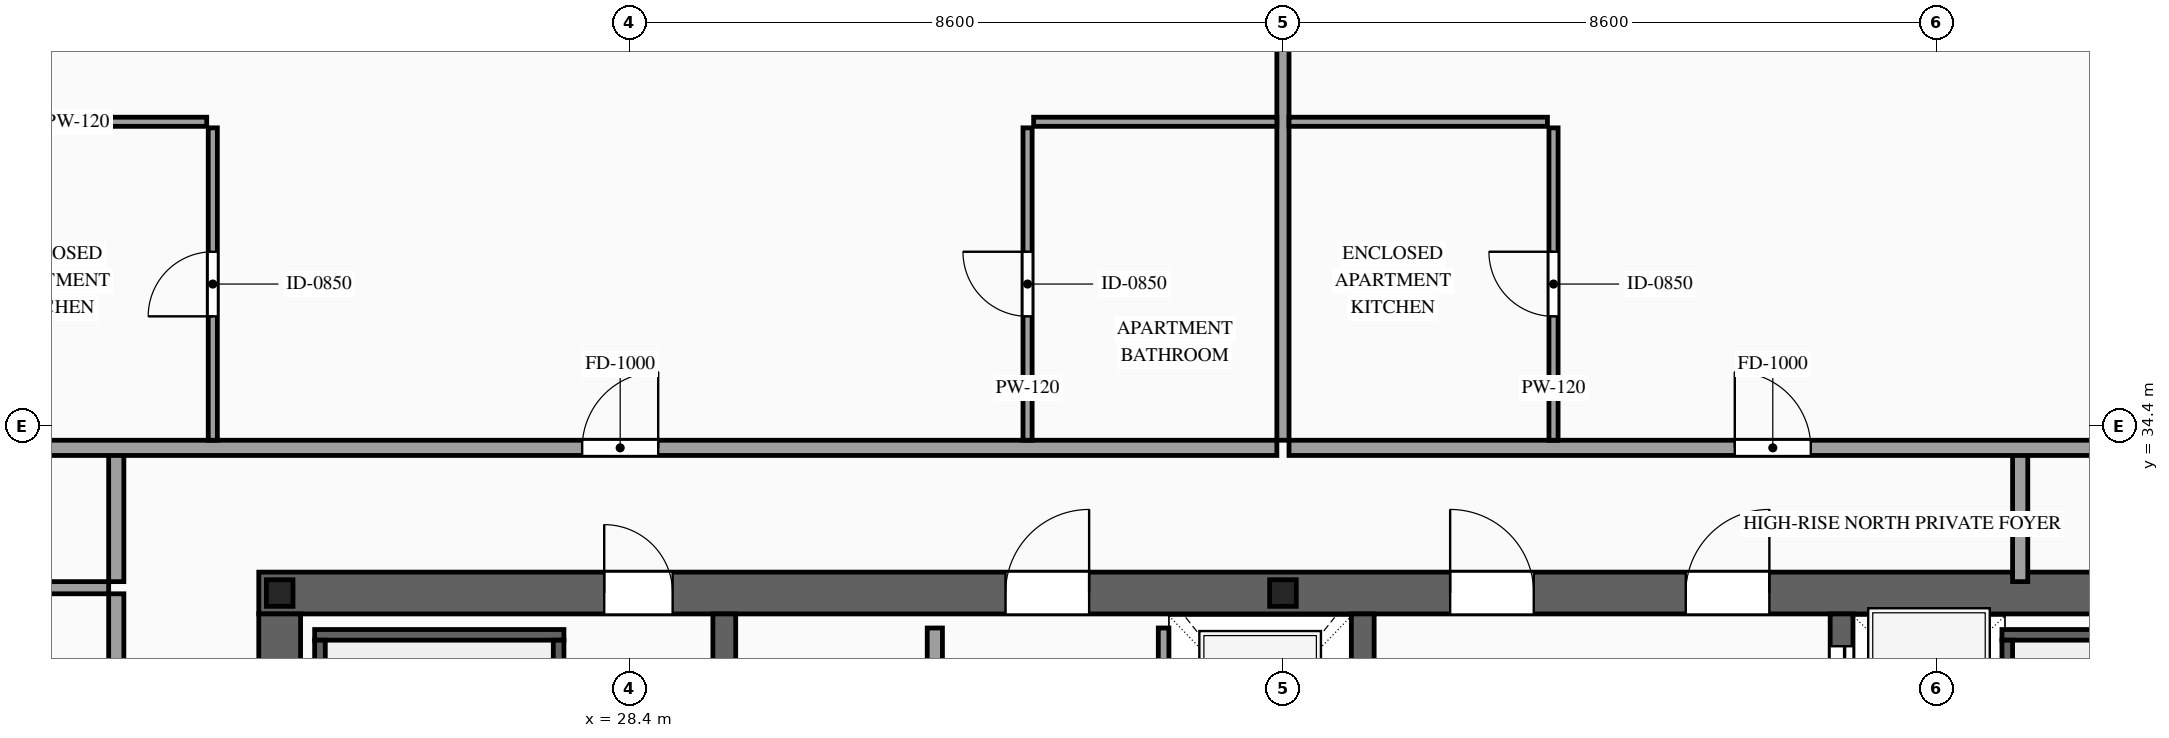
"""IFC4 building model, lengths in metres.
Left out: names, types, materials, properties, quantities, classifications, styles, units other than length and angle.
Written with IfcOpenShell. Run it as: python <this file> out.ifc"""

import sys

from ifc_helpers import new_model, si_unit, direction, frame, frame_2d, origin, origin_2d, place, context, subcontext, project, spatial, rectangle, i_section, extrude, source, transform, mapped, element, fill, save


model = new_model("IFC4")
c1 = context("Model", 3, precision=1e-05, world=origin(), true_north=direction((0.0, 1.0)))
c2 = subcontext(c1, "Body", "Model", "MODEL_VIEW")
j1 = project(units=[si_unit("LENGTHUNIT", "METRE"), si_unit("PLANEANGLEUNIT", "RADIAN")], contexts=[c1])
p1 = place(None, origin())
s1 = spatial("IfcSite", under=j1, at=p1, CompositionType="ELEMENT")
p2 = place(p1, origin())
s2 = spatial("IfcBuilding", under=s1, at=p2, CompositionType="ELEMENT")
p3 = place(p2, frame((0.0, 0.0, 271.6)))
s3 = spatial("IfcBuildingStorey", under=s2, at=p3, CompositionType="ELEMENT", Elevation=271.6)
p4 = place(p3, frame((23.525, 32.2, 0.0), z_axis=(0.0, 0.0, 1.0), x_axis=(1.0, 0.0, 0.0)))
e1 = element("IfcWall", 1, at=p4, inside=s3, PredefinedType="SHEAR", context=c2, shape_type="SweptSolid", body=[
    extrude(rectangle(XDim=26.95, YDim=0.55, at=frame_2d((13.475, 0.0))), origin(), (0.0, 0.0, 1.0), 3.5),
])
p5 = place(p4, frame((4.545, 0.0, 0.0)))
e2 = element("IfcOpeningElement", 2, at=p5, cuts=e1, PredefinedType="OPENING", context=c2, shape_type="SweptSolid", body=[
    extrude(rectangle(XDim=0.9, YDim=2.15, at=frame_2d((0.45, 1.075))), frame((0.0, 0.29, 0.0), z_axis=(0.0, -1.0, 0.0), x_axis=(1.0, 0.0, 0.0)), (0.0, 0.0, 1.0), 0.58),
])
p6 = place(p4, frame((9.825, 0.0, 0.0)))
e3 = element("IfcOpeningElement", 3, at=p6, cuts=e1, PredefinedType="OPENING", context=c2, shape_type="SweptSolid", body=[
    extrude(rectangle(XDim=1.1, YDim=2.2, at=frame_2d((0.55, 1.1))), frame((0.0, 0.29, 0.0), z_axis=(0.0, -1.0, 0.0), x_axis=(1.0, 0.0, 0.0)), (0.0, 0.0, 1.0), 0.58),
])
p7 = place(p4, frame((15.675, 0.0, 0.0)))
e4 = element("IfcOpeningElement", 4, at=p7, cuts=e1, PredefinedType="OPENING", context=c2, shape_type="SweptSolid", body=[
    extrude(rectangle(XDim=1.1, YDim=2.2, at=frame_2d((0.55, 1.1))), frame((0.0, 0.29, 0.0), z_axis=(0.0, -1.0, 0.0), x_axis=(1.0, 0.0, 0.0)), (0.0, 0.0, 1.0), 0.58),
])
p8 = place(p4, frame((18.775, 0.0, 0.0)))
e5 = element("IfcOpeningElement", 5, at=p8, cuts=e1, PredefinedType="OPENING", context=c2, shape_type="SweptSolid", body=[
    extrude(rectangle(XDim=1.1, YDim=2.2, at=frame_2d((0.55, 1.1))), frame((0.0, 0.29, 0.0), z_axis=(0.0, -1.0, 0.0), x_axis=(1.0, 0.0, 0.0)), (0.0, 0.0, 1.0), 0.58),
])
m1 = source(origin(), c2, "Body", "SweptSolid", [
    extrude(rectangle(XDim=12.25, YDim=0.55, at=frame_2d((6.125, 0.0))), origin(), (0.0, 0.0, 1.0), 3.5),
])
p9 = place(p3, frame((23.8, 19.675, 0.0), z_axis=(0.0, 0.0, 1.0), x_axis=(0.0, 1.0, 0.0)))
e6 = element("IfcWall", 6, at=p9, inside=s3, PredefinedType="SHEAR", context=c2, shape_type="MappedRepresentation", body=[
    mapped(m1, transform((0.0, 0.0, 0.0), scale=1.0)),
])
m2 = source(origin(), c2, "Body", "SweptSolid", [
    extrude(rectangle(XDim=12.25, YDim=0.3, at=frame_2d((6.125, 0.0))), origin(), (0.0, 0.0, 1.0), 3.5),
])
for number, where, z_axis, x_axis in (
    (7, (29.65, 19.675, 0.0), (0.0, 0.0, 1.0), (0.0, 1.0, 0.0)),
    (8, (38.05, 19.675, 0.0), (0.0, 0.0, 1.0), (0.0, 1.0, 0.0)),
):
    element("IfcWall", number, at=place(p3, frame(where, z_axis=z_axis, x_axis=x_axis)), inside=s3, PredefinedType="SOLIDWALL", context=c2, shape_type="MappedRepresentation", body=[
        mapped(m2, transform((0.0, 0.0, 0.0), scale=1.0)),
    ])
p10 = place(p3, frame((44.35, 19.675, 0.0), z_axis=(0.0, 0.0, 1.0), x_axis=(0.0, 1.0, 0.0)))
e9 = element("IfcWall", 9, at=p10, inside=s3, PredefinedType="SOLIDWALL", context=c2, shape_type="SweptSolid", body=[
    extrude(rectangle(XDim=12.25, YDim=0.3, at=frame_2d((6.125, 0.0))), origin(), (0.0, 0.0, 1.0), 3.5),
])
p11 = place(p10, frame((6.525, 0.0, 0.0)))
e10 = element("IfcOpeningElement", 10, at=p11, cuts=e9, PredefinedType="OPENING", context=c2, shape_type="SweptSolid", body=[
    extrude(rectangle(XDim=1.1, YDim=2.2, at=frame_2d((0.55, 1.1))), frame((0.0, 0.165, 0.0), z_axis=(0.0, -1.0, 0.0), x_axis=(1.0, 0.0, 0.0)), (0.0, 0.0, 1.0), 0.33),
])
p12 = place(p10, frame((8.625, 0.0, 0.0)))
e11 = element("IfcOpeningElement", 11, at=p12, cuts=e9, PredefinedType="OPENING", context=c2, shape_type="SweptSolid", body=[
    extrude(rectangle(XDim=1.1, YDim=2.2, at=frame_2d((0.55, 1.1))), frame((0.0, 0.165, 0.0), z_axis=(0.0, -1.0, 0.0), x_axis=(1.0, 0.0, 0.0)), (0.0, 0.0, 1.0), 0.33),
])
p13 = place(p10, frame((10.725, 0.0, 0.0)))
e12 = element("IfcOpeningElement", 12, at=p13, cuts=e9, PredefinedType="OPENING", context=c2, shape_type="SweptSolid", body=[
    extrude(rectangle(XDim=1.1, YDim=2.2, at=frame_2d((0.55, 1.1))), frame((0.0, 0.165, 0.0), z_axis=(0.0, -1.0, 0.0), x_axis=(1.0, 0.0, 0.0)), (0.0, 0.0, 1.0), 0.33),
])
m3 = source(origin(), c2, "Body", "SweptSolid", [
    extrude(i_section(OverallWidth=0.35, OverallDepth=0.35, WebThickness=0.012, FlangeThickness=0.019, at=origin_2d()), origin(), (0.0, 0.0, 1.0), 3.5),
])
for number, where, z_axis, x_axis in (
    (13, (23.8, 32.2, 0.0), (0.0, 0.0, 1.0), (1.0, 0.0, 0.0)),
    (14, (37.0, 32.2, 0.0), (0.0, 0.0, 1.0), (1.0, 0.0, 0.0)),
):
    element("IfcColumn", number, at=place(p3, frame(where, z_axis=z_axis, x_axis=x_axis)), inside=s3, PredefinedType="COLUMN", context=c2, shape_type="MappedRepresentation", body=[
        mapped(m3, transform((0.0, 0.0, 0.0), scale=1.0)),
    ])
p14 = place(p3, frame((35.43, 29.4, 0.0), z_axis=(0.0, 0.0, 1.0), x_axis=(0.0, 1.0, 0.0)))
e15 = element("IfcWall", 15, at=p14, inside=s3, PredefinedType="SOLIDWALL", context=c2, shape_type="SweptSolid", body=[
    extrude(rectangle(XDim=2.34, YDim=0.14, at=frame_2d((1.17, 0.0))), origin(), (0.0, 0.0, 1.0), 3.28),
])
p15 = place(p14, frame((0.62, 0.0, 0.0)))
e16 = element("IfcOpeningElement", 16, at=p15, cuts=e15, PredefinedType="OPENING", context=c2, shape_type="SweptSolid", body=[
    extrude(rectangle(XDim=1.1, YDim=2.2, at=frame_2d((0.55, 1.1))), frame((0.0, 0.085, 0.0), z_axis=(0.0, -1.0, 0.0), x_axis=(1.0, 0.0, 0.0)), (0.0, 0.0, 1.0), 0.17),
])
m4 = source(origin(), c2, "Body", "SweptSolid", [
    extrude(rectangle(XDim=3.28, YDim=0.14, at=frame_2d((1.64, 0.0))), origin(), (0.0, 0.0, 1.0), 3.28),
])
p16 = place(p3, frame((24.26, 31.65, 0.0), z_axis=(0.0, 0.0, 1.0), x_axis=(1.0, 0.0, 0.0)))
e17 = element("IfcWall", 17, at=p16, inside=s3, PredefinedType="SOLIDWALL", context=c2, shape_type="MappedRepresentation", body=[
    mapped(m4, transform((0.0, 0.0, 0.0), scale=1.0)),
])
m5 = source(origin(), c2, "Body", "SweptSolid", [
    extrude(rectangle(XDim=8.94, YDim=0.14, at=frame_2d((4.47, 0.0))), origin(), (0.0, 0.0, 1.0), 3.28),
])
for number, where, z_axis, x_axis in (
    (18, (24.33, 22.64, 0.0), (0.0, 0.0, 1.0), (0.0, 1.0, 0.0)),
    (19, (27.47, 22.64, 0.0), (0.0, 0.0, 1.0), (0.0, 1.0, 0.0)),
):
    element("IfcWall", number, at=place(p3, frame(where, z_axis=z_axis, x_axis=x_axis)), inside=s3, PredefinedType="SOLIDWALL", context=c2, shape_type="MappedRepresentation", body=[
        mapped(m5, transform((0.0, 0.0, 0.0), scale=1.0)),
    ])
p17 = place(p3, frame((46.46, 31.65, 0.0), z_axis=(0.0, 0.0, 1.0), x_axis=(1.0, 0.0, 0.0)))
e20 = element("IfcWall", 20, at=p17, inside=s3, PredefinedType="SOLIDWALL", context=c2, shape_type="MappedRepresentation", body=[
    mapped(m4, transform((0.0, 0.0, 0.0), scale=1.0)),
])
p18 = place(p3, frame((46.53, 22.64, 0.0), z_axis=(0.0, 0.0, 1.0), x_axis=(0.0, 1.0, 0.0)))
e21 = element("IfcWall", 21, at=p18, inside=s3, PredefinedType="SOLIDWALL", context=c2, shape_type="MappedRepresentation", body=[
    mapped(m5, transform((0.0, 0.0, 0.0), scale=1.0)),
])
p19 = place(p3, frame((32.42, 28.05, 0.0), z_axis=(0.0, 0.0, 1.0), x_axis=(0.0, 1.0, 0.0)))
e22 = element("IfcWall", 22, at=p19, inside=s3, PredefinedType="PARTITIONING", context=c2, shape_type="SweptSolid", body=[
    extrude(rectangle(XDim=3.69, YDim=0.2, at=frame_2d((1.845, 0.0))), origin(), (0.0, 0.0, 1.0), 3.28),
])
p20 = place(p19, frame((1.395, 0.0, 0.0)))
e23 = element("IfcOpeningElement", 23, at=p20, cuts=e22, PredefinedType="OPENING", context=c2, shape_type="SweptSolid", body=[
    extrude(rectangle(XDim=0.9, YDim=2.15, at=frame_2d((0.45, 1.075))), frame((0.0, 0.115, 0.0), z_axis=(0.0, -1.0, 0.0), x_axis=(1.0, 0.0, 0.0)), (0.0, 0.0, 1.0), 0.23),
])
m6 = source(origin(), c2, "Body", "SweptSolid", [
    extrude(rectangle(XDim=1.7, YDim=0.2, at=frame_2d((0.85, 0.0))), origin(), (0.0, 0.0, 1.0), 3.28),
])
for number, where, z_axis, x_axis in (
    (24, (21.65, 32.35, 0.0), (0.0, 0.0, 1.0), (0.0, 1.0, 0.0)),
    (25, (46.7, 32.35, 0.0), (0.0, 0.0, 1.0), (0.0, 1.0, 0.0)),
):
    element("IfcWall", number, at=place(p3, frame(where, z_axis=z_axis, x_axis=x_axis)), inside=s3, PredefinedType="PARTITIONING", context=c2, shape_type="MappedRepresentation", body=[
        mapped(m6, transform((0.0, 0.0, 0.0), scale=1.0)),
    ])
p21 = place(p3, frame((19.44, 34.11, 0.0), z_axis=(0.0, 0.0, 1.0), x_axis=(1.0, 0.0, 0.0)))
e26 = element("IfcWall", 26, at=p21, inside=s3, PredefinedType="PARTITIONING", context=c2, shape_type="SweptSolid", body=[
    extrude(rectangle(XDim=17.48, YDim=0.2, at=frame_2d((8.74, 0.0))), origin(), (0.0, 0.0, 1.0), 3.28),
])
p22 = place(p21, frame((8.34, 0.0, 0.0)))
e27 = element("IfcOpeningElement", 27, at=p22, cuts=e26, PredefinedType="OPENING", context=c2, shape_type="SweptSolid", body=[
    extrude(rectangle(XDim=1.0, YDim=2.2, at=frame_2d((0.5, 1.1))), frame((0.0, 0.115, 0.0), z_axis=(0.0, -1.0, 0.0), x_axis=(1.0, 0.0, 0.0)), (0.0, 0.0, 1.0), 0.23),
])
m7 = source(origin(), c2, "Body", "SweptSolid", [
    extrude(rectangle(XDim=12.04, YDim=0.16, at=frame_2d((6.02, 0.0))), origin(), (0.0, 0.0, 1.0), 2.787),
])
p23 = place(p3, frame((37.0, 34.21, 0.0), z_axis=(0.0, 0.0, 1.0), x_axis=(0.0, 1.0, 0.0)))
e28 = element("IfcWall", 28, at=p23, inside=s3, PredefinedType="PARTITIONING", context=c2, shape_type="MappedRepresentation", body=[
    mapped(m7, transform((0.0, 0.0, 0.0), scale=1.0)),
])
m8 = source(origin(), c2, "Body", "SweptSolid", [
    extrude(rectangle(XDim=3.4, YDim=0.12, at=frame_2d((1.7, 0.0))), origin(), (0.0, 0.0, 1.0), 3.28),
])
p24 = place(p3, frame((19.44, 38.4, 0.0), z_axis=(0.0, 0.0, 1.0), x_axis=(1.0, 0.0, 0.0)))
e29 = element("IfcWall", 29, at=p24, inside=s3, PredefinedType="PARTITIONING", context=c2, shape_type="MappedRepresentation", body=[
    mapped(m8, transform((0.0, 0.0, 0.0), scale=1.0)),
])
p25 = place(p3, frame((22.92, 34.21, 0.0), z_axis=(0.0, 0.0, 1.0), x_axis=(0.0, 1.0, 0.0)))
e30 = element("IfcWall", 30, at=p25, inside=s3, PredefinedType="PARTITIONING", context=c2, shape_type="SweptSolid", body=[
    extrude(rectangle(XDim=4.11, YDim=0.12, at=frame_2d((2.055, 0.0))), origin(), (0.0, 0.0, 1.0), 3.28),
])
p26 = place(p25, frame((1.63, 0.0, 0.0)))
e31 = element("IfcOpeningElement", 31, at=p26, cuts=e30, PredefinedType="OPENING", context=c2, shape_type="SweptSolid", body=[
    extrude(rectangle(XDim=0.85, YDim=2.1, at=frame_2d((0.425, 1.05))), frame((0.0, 0.075, 0.0), z_axis=(0.0, -1.0, 0.0), x_axis=(1.0, 0.0, 0.0)), (0.0, 0.0, 1.0), 0.15),
])
m9 = source(origin(), c2, "Body", "SweptSolid", [
    extrude(rectangle(XDim=3.2, YDim=0.12, at=frame_2d((1.6, 0.0))), origin(), (0.0, 0.0, 1.0), 3.28),
])
p27 = place(p3, frame((33.72, 38.4, 0.0), z_axis=(0.0, 0.0, 1.0), x_axis=(1.0, 0.0, 0.0)))
e32 = element("IfcWall", 32, at=p27, inside=s3, PredefinedType="PARTITIONING", context=c2, shape_type="MappedRepresentation", body=[
    mapped(m9, transform((0.0, 0.0, 0.0), scale=1.0)),
])
p28 = place(p3, frame((33.64, 34.21, 0.0), z_axis=(0.0, 0.0, 1.0), x_axis=(0.0, 1.0, 0.0)))
e33 = element("IfcWall", 33, at=p28, inside=s3, PredefinedType="PARTITIONING", context=c2, shape_type="SweptSolid", body=[
    extrude(rectangle(XDim=4.11, YDim=0.12, at=frame_2d((2.055, 0.0))), origin(), (0.0, 0.0, 1.0), 3.28),
])
p29 = place(p28, frame((1.63, 0.0, 0.0)))
e34 = element("IfcOpeningElement", 34, at=p29, cuts=e33, PredefinedType="OPENING", context=c2, shape_type="SweptSolid", body=[
    extrude(rectangle(XDim=0.85, YDim=2.1, at=frame_2d((0.425, 1.05))), frame((0.0, 0.075, 0.0), z_axis=(0.0, -1.0, 0.0), x_axis=(1.0, 0.0, 0.0)), (0.0, 0.0, 1.0), 0.15),
])
p30 = place(p3, frame((37.08, 34.11, 0.0), z_axis=(0.0, 0.0, 1.0), x_axis=(1.0, 0.0, 0.0)))
e35 = element("IfcWall", 35, at=p30, inside=s3, PredefinedType="PARTITIONING", context=c2, shape_type="SweptSolid", body=[
    extrude(rectangle(XDim=17.48, YDim=0.2, at=frame_2d((8.74, 0.0))), origin(), (0.0, 0.0, 1.0), 3.28),
])
p31 = place(p30, frame((5.865, 0.0, 0.0)))
e36 = element("IfcOpeningElement", 36, at=p31, cuts=e35, PredefinedType="OPENING", context=c2, shape_type="SweptSolid", body=[
    extrude(rectangle(XDim=1.0, YDim=2.2, at=frame_2d((0.5, 1.1))), frame((0.0, 0.115, 0.0), z_axis=(0.0, -1.0, 0.0), x_axis=(1.0, 0.0, 0.0)), (0.0, 0.0, 1.0), 0.23),
])
m10 = source(origin(), c2, "Body", "SweptSolid", [
    extrude(rectangle(XDim=3.4, YDim=0.12, at=frame_2d((1.7, 0.0))), origin(), (0.0, 0.0, 1.0), 3.28),
])
p32 = place(p3, frame((37.08, 38.4, 0.0), z_axis=(0.0, 0.0, 1.0), x_axis=(1.0, 0.0, 0.0)))
e37 = element("IfcWall", 37, at=p32, inside=s3, PredefinedType="PARTITIONING", context=c2, shape_type="MappedRepresentation", body=[
    mapped(m10, transform((0.0, 0.0, 0.0), scale=1.0)),
])
p33 = place(p3, frame((40.56, 34.21, 0.0), z_axis=(0.0, 0.0, 1.0), x_axis=(0.0, 1.0, 0.0)))
e38 = element("IfcWall", 38, at=p33, inside=s3, PredefinedType="PARTITIONING", context=c2, shape_type="SweptSolid", body=[
    extrude(rectangle(XDim=4.11, YDim=0.12, at=frame_2d((2.055, 0.0))), origin(), (0.0, 0.0, 1.0), 3.28),
])
p34 = place(p33, frame((1.63, 0.0, 0.0)))
e39 = element("IfcOpeningElement", 39, at=p34, cuts=e38, PredefinedType="OPENING", context=c2, shape_type="SweptSolid", body=[
    extrude(rectangle(XDim=0.85, YDim=2.1, at=frame_2d((0.425, 1.05))), frame((0.0, 0.075, 0.0), z_axis=(0.0, -1.0, 0.0), x_axis=(1.0, 0.0, 0.0)), (0.0, 0.0, 1.0), 0.15),
])
p35 = place(p3, frame((21.65, 19.41, 0.0), z_axis=(0.0, 0.0, 1.0), x_axis=(0.0, 1.0, 0.0)))
e40 = element("IfcWall", 40, at=p35, inside=s3, PredefinedType="PARTITIONING", context=c2, shape_type="SweptSolid", body=[
    extrude(rectangle(XDim=12.78, YDim=0.2, at=frame_2d((6.39, 0.0))), origin(), (0.0, 0.0, 1.0), 3.28),
])
p36 = place(p35, frame((5.89, 0.0, 0.0)))
e41 = element("IfcOpeningElement", 41, at=p36, cuts=e40, PredefinedType="OPENING", context=c2, shape_type="SweptSolid", body=[
    extrude(rectangle(XDim=1.0, YDim=2.2, at=frame_2d((0.5, 1.1))), frame((0.0, 0.115, 0.0), z_axis=(0.0, -1.0, 0.0), x_axis=(1.0, 0.0, 0.0)), (0.0, 0.0, 1.0), 0.23),
])
m11 = source(origin(), c2, "Body", "SweptSolid", [
    extrude(rectangle(XDim=5.0, YDim=0.16, at=frame_2d((2.5, 0.0))), origin(), (0.0, 0.0, 1.0), 2.825),
])
p37 = place(p3, frame((16.55, 32.27, 0.0), z_axis=(0.0, 0.0, 1.0), x_axis=(1.0, 0.0, 0.0)))
e42 = element("IfcWall", 42, at=p37, inside=s3, PredefinedType="PARTITIONING", context=c2, shape_type="MappedRepresentation", body=[
    mapped(m11, transform((0.0, 0.0, 0.0), scale=1.0)),
])
m12 = source(origin(), c2, "Body", "SweptSolid", [
    extrude(rectangle(XDim=1.1, YDim=2.2, at=frame_2d((0.55, 1.1))), frame((0.0, 0.025, 0.0), z_axis=(0.0, -1.0, 0.0), x_axis=(1.0, 0.0, 0.0)), (0.0, 0.0, 1.0), 0.05),
])
p38 = place(p13, origin())
e43 = element("IfcDoor", 43, at=p38, inside=s3, OperationType="SLIDING_TO_LEFT", PredefinedType="DOOR", context=c2, shape_type="MappedRepresentation", body=[
    mapped(m12, transform((0.0, 0.0, 0.0), scale=1.0)),
])
fill(e12, e43)
m13 = source(origin(), c2, "Body", "SweptSolid", [
    extrude(rectangle(XDim=0.9, YDim=2.15, at=frame_2d((0.45, 1.075))), frame((0.0, 0.025, 0.0), z_axis=(0.0, -1.0, 0.0), x_axis=(1.0, 0.0, 0.0)), (0.0, 0.0, 1.0), 0.05),
])
p39 = place(p5, origin())
e44 = element("IfcDoor", 44, at=p39, inside=s3, OperationType="SINGLE_SWING_LEFT", PredefinedType="DOOR", context=c2, shape_type="MappedRepresentation", body=[
    mapped(m13, transform((0.0, 0.0, 0.0), scale=1.0)),
])
fill(e2, e44)
m14 = source(origin(), c2, "Body", "SweptSolid", [
    extrude(rectangle(XDim=1.1, YDim=2.2, at=frame_2d((0.55, 1.1))), frame((0.0, 0.025, 0.0), z_axis=(0.0, -1.0, 0.0), x_axis=(1.0, 0.0, 0.0)), (0.0, 0.0, 1.0), 0.05),
])
p40 = place(p6, origin())
e45 = element("IfcDoor", 45, at=p40, inside=s3, OperationType="SINGLE_SWING_RIGHT", PredefinedType="DOOR", context=c2, shape_type="MappedRepresentation", body=[
    mapped(m14, transform((0.0, 0.0, 0.0), scale=1.0)),
])
fill(e3, e45)
p41 = place(p7, origin())
e46 = element("IfcDoor", 46, at=p41, inside=s3, OperationType="SINGLE_SWING_LEFT", PredefinedType="DOOR", context=c2, shape_type="MappedRepresentation", body=[
    mapped(m14, transform((0.0, 0.0, 0.0), scale=1.0)),
])
fill(e4, e46)
p42 = place(p8, origin())
e47 = element("IfcDoor", 47, at=p42, inside=s3, OperationType="SINGLE_SWING_RIGHT", PredefinedType="DOOR", context=c2, shape_type="MappedRepresentation", body=[
    mapped(m14, transform((0.0, 0.0, 0.0), scale=1.0)),
])
fill(e5, e47)
m15 = source(origin(), c2, "Body", "SweptSolid", [
    extrude(rectangle(XDim=1.0, YDim=2.2, at=frame_2d((0.5, 1.1))), frame((0.0, 0.025, 0.0), z_axis=(0.0, -1.0, 0.0), x_axis=(1.0, 0.0, 0.0)), (0.0, 0.0, 1.0), 0.05),
])
p43 = place(p22, origin())
e48 = element("IfcDoor", 48, at=p43, inside=s3, OperationType="SINGLE_SWING_RIGHT", PredefinedType="DOOR", context=c2, shape_type="MappedRepresentation", body=[
    mapped(m15, transform((0.0, 0.0, 0.0), scale=1.0)),
])
fill(e27, e48)
m16 = source(origin(), c2, "Body", "SweptSolid", [
    extrude(rectangle(XDim=0.85, YDim=2.1, at=frame_2d((0.425, 1.05))), frame((0.0, 0.025, 0.0), z_axis=(0.0, -1.0, 0.0), x_axis=(1.0, 0.0, 0.0)), (0.0, 0.0, 1.0), 0.05),
])
p44 = place(p26, origin())
e49 = element("IfcDoor", 49, at=p44, inside=s3, OperationType="SINGLE_SWING_LEFT", PredefinedType="DOOR", context=c2, shape_type="MappedRepresentation", body=[
    mapped(m16, transform((0.0, 0.0, 0.0), scale=1.0)),
])
fill(e31, e49)
p45 = place(p29, origin())
e50 = element("IfcDoor", 50, at=p45, inside=s3, OperationType="SINGLE_SWING_RIGHT", PredefinedType="DOOR", context=c2, shape_type="MappedRepresentation", body=[
    mapped(m16, transform((0.0, 0.0, 0.0), scale=1.0)),
])
fill(e34, e50)
p46 = place(p31, origin())
e51 = element("IfcDoor", 51, at=p46, inside=s3, OperationType="SINGLE_SWING_LEFT", PredefinedType="DOOR", context=c2, shape_type="MappedRepresentation", body=[
    mapped(m15, transform((0.0, 0.0, 0.0), scale=1.0)),
])
fill(e36, e51)
p47 = place(p34, origin())
e52 = element("IfcDoor", 52, at=p47, inside=s3, OperationType="SINGLE_SWING_RIGHT", PredefinedType="DOOR", context=c2, shape_type="MappedRepresentation", body=[
    mapped(m16, transform((0.0, 0.0, 0.0), scale=1.0)),
])
fill(e39, e52)
save(model, sys.argv[1])
